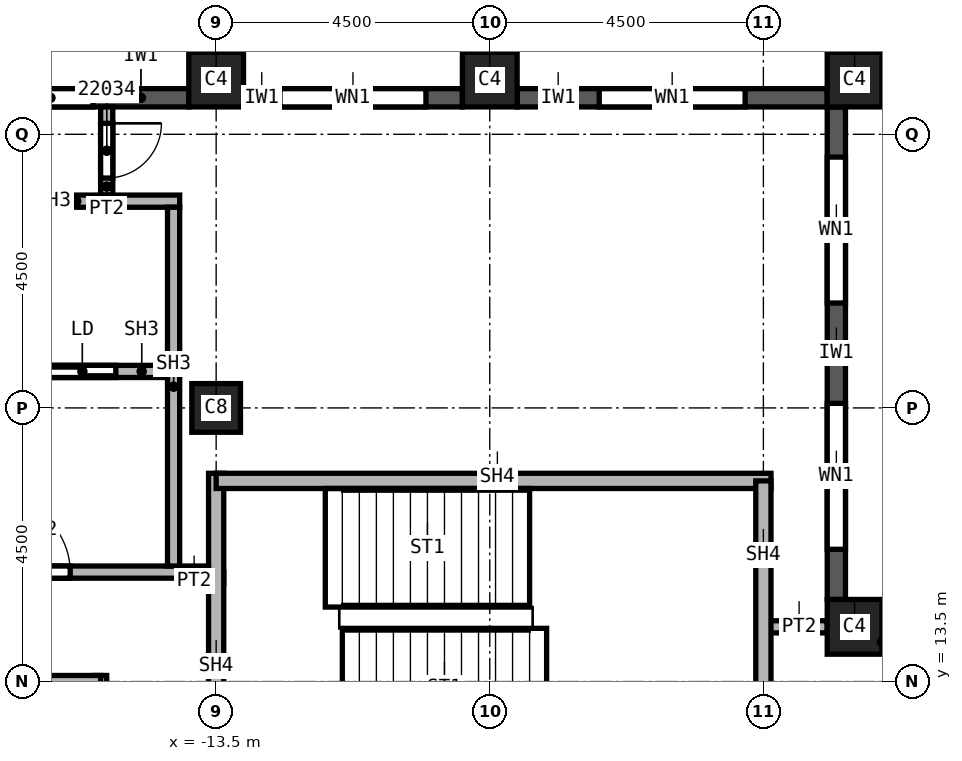
"""IFC4 building model, lengths in metres.
Left out: names, types, materials, properties, quantities, classifications, styles, units other than length and angle.
Written with IfcOpenShell. Run it as: python <this file> out.ifc"""

import sys

from ifc_helpers import new_model, si_unit, direction, frame, frame_2d, origin, origin_2d, place, context, subcontext, project, spatial, rectangle, extrude, element, fill, save


model = new_model("IFC4")
c1 = context("Model", 3, precision=1e-05, world=origin(), true_north=direction((0.0, 1.0)))
c2 = subcontext(c1, "Body", "Model", "MODEL_VIEW")
j1 = project(units=[si_unit("LENGTHUNIT", "METRE"), si_unit("PLANEANGLEUNIT", "RADIAN")], contexts=[c1])
p1 = place(None, origin())
s1 = spatial("IfcSite", under=j1, at=p1, CompositionType="ELEMENT")
p2 = place(p1, origin())
s2 = spatial("IfcBuilding", under=s1, at=p2, CompositionType="ELEMENT")
p3 = place(p2, frame((0.0, 0.0, 316.0)))
s3 = spatial("IfcBuildingStorey", under=s2, at=p3, CompositionType="ELEMENT", Elevation=316.0)
p4 = place(p3, frame((-13.5, 18.0, 0.0), z_axis=(0.0, 0.0, 1.0), x_axis=(1.0, 0.0, 0.0)))
e1 = element("IfcColumn", 1, at=p4, inside=s3, PredefinedType="COLUMN", context=c2, shape_type="SweptSolid", body=[
    extrude(rectangle(XDim=0.8, YDim=0.8, at=origin_2d()), origin(), (0.0, 0.0, 1.0), 3.59),
])
for number, where, z_axis, x_axis in (
    (2, (-3.0, 23.4, 0.0), (0.0, 0.0, 1.0), (1.0, 0.0, 0.0)),
    (3, (-9.0, 23.4, 0.0), (0.0, 0.0, 1.0), (1.0, 0.0, 0.0)),
    (4, (-13.5, 23.4, 0.0), (0.0, 0.0, 1.0), (1.0, 0.0, 0.0)),
    (5, (-3.0, 14.4, 0.0), (0.0, 0.0, 1.0), (1.0, 0.0, 0.0)),
):
    element("IfcColumn", number, at=place(p3, frame(where, z_axis=z_axis, x_axis=x_axis)), inside=s3, PredefinedType="COLUMN", context=c2, shape_type="SweptSolid", body=[
        extrude(rectangle(XDim=0.9, YDim=0.9, at=origin_2d()), origin(), (0.0, 0.0, 1.0), 3.59),
    ])
p5 = place(p3, frame((-3.3, 14.85, 0.0), z_axis=(0.0, 0.0, 1.0), x_axis=(0.0, 1.0, 0.0)))
e6 = element("IfcWall", 6, at=p5, inside=s3, PredefinedType="SOLIDWALL", context=c2, shape_type="SweptSolid", body=[
    extrude(rectangle(XDim=8.1, YDim=0.3, at=frame_2d((4.05, 0.0))), origin(), (0.0, 0.0, 1.0), 2.99),
])
p6 = place(p5, frame((0.825, 0.0, 0.8)))
e7 = element("IfcOpeningElement", 7, at=p6, cuts=e6, PredefinedType="OPENING", context=c2, shape_type="SweptSolid", body=[
    extrude(rectangle(XDim=2.4, YDim=1.95, at=frame_2d((1.2, 0.975))), frame((0.0, 0.15, 0.0), z_axis=(0.0, -1.0, 0.0), x_axis=(1.0, 0.0, 0.0)), (0.0, 0.0, 1.0), 0.3),
])
p7 = place(p5, frame((4.875, 0.0, 0.8)))
e8 = element("IfcOpeningElement", 8, at=p7, cuts=e6, PredefinedType="OPENING", context=c2, shape_type="SweptSolid", body=[
    extrude(rectangle(XDim=2.4, YDim=1.95, at=frame_2d((1.2, 0.975))), frame((0.0, 0.15, 0.0), z_axis=(0.0, -1.0, 0.0), x_axis=(1.0, 0.0, 0.0)), (0.0, 0.0, 1.0), 0.3),
])
p8 = place(p3, frame((-3.45, 23.1, 0.0), z_axis=(0.0, 0.0, 1.0), x_axis=(-1.0, 0.0, 0.0)))
e9 = element("IfcWall", 9, at=p8, inside=s3, PredefinedType="SOLIDWALL", context=c2, shape_type="SweptSolid", body=[
    extrude(rectangle(XDim=5.1, YDim=0.3, at=frame_2d((2.55, 0.0))), origin(), (0.0, 0.0, 1.0), 2.99),
])
p9 = place(p8, frame((1.35, 0.0, 0.8)))
e10 = element("IfcOpeningElement", 10, at=p9, cuts=e9, PredefinedType="OPENING", context=c2, shape_type="SweptSolid", body=[
    extrude(rectangle(XDim=2.4, YDim=1.95, at=frame_2d((1.2, 0.975))), frame((0.0, 0.15, 0.0), z_axis=(0.0, -1.0, 0.0), x_axis=(1.0, 0.0, 0.0)), (0.0, 0.0, 1.0), 0.3),
])
p10 = place(p3, frame((-9.45, 23.1, 0.0), z_axis=(0.0, 0.0, 1.0), x_axis=(-1.0, 0.0, 0.0)))
e11 = element("IfcWall", 11, at=p10, inside=s3, PredefinedType="SOLIDWALL", context=c2, shape_type="SweptSolid", body=[
    extrude(rectangle(XDim=3.6, YDim=0.3, at=frame_2d((1.8, 0.0))), origin(), (0.0, 0.0, 1.0), 2.99),
])
p11 = place(p10, frame((0.6, 0.0, 0.8)))
e12 = element("IfcOpeningElement", 12, at=p11, cuts=e11, PredefinedType="OPENING", context=c2, shape_type="SweptSolid", body=[
    extrude(rectangle(XDim=2.4, YDim=1.95, at=frame_2d((1.2, 0.975))), frame((0.0, 0.15, 0.0), z_axis=(0.0, -1.0, 0.0), x_axis=(1.0, 0.0, 0.0)), (0.0, 0.0, 1.0), 0.3),
])
p12 = place(p3, frame((-13.95, 23.1, 0.0), z_axis=(0.0, 0.0, 1.0), x_axis=(-1.0, 0.0, 0.0)))
e13 = element("IfcWall", 13, at=p12, inside=s3, PredefinedType="SOLIDWALL", context=c2, shape_type="SweptSolid", body=[
    extrude(rectangle(XDim=3.6, YDim=0.3, at=frame_2d((1.8, 0.0))), origin(), (0.0, 0.0, 1.0), 2.99),
])
p13 = place(p12, frame((1.575, 0.0, 0.8)))
e14 = element("IfcOpeningElement", 14, at=p13, cuts=e13, PredefinedType="OPENING", context=c2, shape_type="SweptSolid", body=[
    extrude(rectangle(XDim=1.4, YDim=1.95, at=frame_2d((0.7, 0.975))), frame((0.0, 0.15, 0.0), z_axis=(0.0, -1.0, 0.0), x_axis=(1.0, 0.0, 0.0)), (0.0, 0.0, 1.0), 0.3),
])
p14 = place(p3, frame((-15.4, -22.95, 0.0), z_axis=(0.0, 0.0, 1.0), x_axis=(0.0, 1.0, 0.0)))
e15 = element("IfcWall", 15, at=p14, inside=s3, PredefinedType="PARTITIONING", context=c2, shape_type="SweptSolid", body=[
    extrude(rectangle(XDim=36.55, YDim=0.2, at=frame_2d((18.275, 0.0))), origin(), (0.0, 0.0, 1.0), 3.59),
])
p15 = place(p14, frame((24.3, 0.0, 0.0)))
e16 = element("IfcOpeningElement", 16, at=p15, cuts=e15, PredefinedType="OPENING", context=c2, shape_type="SweptSolid", body=[
    extrude(rectangle(XDim=1.0, YDim=2.1, at=frame_2d((0.5, 1.05))), frame((0.0, 0.1, 0.0), z_axis=(0.0, -1.0, 0.0), x_axis=(1.0, 0.0, 0.0)), (0.0, 0.0, 1.0), 0.2),
])
p16 = place(p14, frame((9.4, 0.0, 0.0)))
e17 = element("IfcOpeningElement", 17, at=p16, cuts=e15, PredefinedType="OPENING", context=c2, shape_type="SweptSolid", body=[
    extrude(rectangle(XDim=1.0, YDim=2.1, at=frame_2d((0.5, 1.05))), frame((0.0, 0.1, 0.0), z_axis=(0.0, -1.0, 0.0), x_axis=(1.0, 0.0, 0.0)), (0.0, 0.0, 1.0), 0.2),
])
p17 = place(p14, frame((19.05, 0.0, 0.0)))
e18 = element("IfcOpeningElement", 18, at=p17, cuts=e15, PredefinedType="OPENING", context=c2, shape_type="SweptSolid", body=[
    extrude(rectangle(XDim=1.0, YDim=2.1, at=frame_2d((0.5, 1.05))), frame((0.0, 0.1, 0.0), z_axis=(0.0, -1.0, 0.0), x_axis=(1.0, 0.0, 0.0)), (0.0, 0.0, 1.0), 0.2),
])
p18 = place(p3, frame((-15.4, 13.5, 0.0), z_axis=(0.0, 0.0, 1.0), x_axis=(-1.0, 0.0, 0.0)))
e19 = element("IfcWall", 19, at=p18, inside=s3, PredefinedType="PARTITIONING", context=c2, shape_type="SweptSolid", body=[
    extrude(rectangle(XDim=6.6, YDim=0.2, at=frame_2d((3.3, 0.0))), origin(), (0.0, 0.0, 1.0), 3.59),
])
p19 = place(p18, frame((5.35, 0.0, 0.0)))
e20 = element("IfcOpeningElement", 20, at=p19, cuts=e19, PredefinedType="OPENING", context=c2, shape_type="SweptSolid", body=[
    extrude(rectangle(XDim=1.0, YDim=2.1, at=frame_2d((0.5, 1.05))), frame((0.0, 0.1, 0.0), z_axis=(0.0, -1.0, 0.0), x_axis=(1.0, 0.0, 0.0)), (0.0, 0.0, 1.0), 0.2),
])
p20 = place(p3, frame((-15.3, 22.95, 0.0), z_axis=(0.0, 0.0, 1.0), x_axis=(0.0, -1.0, 0.0)))
e21 = element("IfcWall", 21, at=p20, inside=s3, PredefinedType="PARTITIONING", context=c2, shape_type="SweptSolid", body=[
    extrude(rectangle(XDim=1.45, YDim=0.2, at=frame_2d((0.725, 0.0))), origin(), (0.0, 0.0, 1.0), 3.59),
])
p21 = place(p20, frame((0.27, 0.0, 0.0)))
e22 = element("IfcOpeningElement", 22, at=p21, cuts=e21, PredefinedType="OPENING", context=c2, shape_type="SweptSolid", body=[
    extrude(rectangle(XDim=0.9, YDim=2.1, at=frame_2d((0.45, 1.05))), frame((0.0, 0.1, 0.0), z_axis=(0.0, -1.0, 0.0), x_axis=(1.0, 0.0, 0.0)), (0.0, 0.0, 1.0), 0.2),
])
p22 = place(p3, frame((-14.1, 15.2, 0.0), z_axis=(0.0, 0.0, 1.0), x_axis=(1.0, 0.0, 0.0)))
e23 = element("IfcWall", 23, at=p22, inside=s3, PredefinedType="PARTITIONING", context=c2, shape_type="SweptSolid", body=[
    extrude(rectangle(XDim=0.725, YDim=0.2, at=frame_2d((0.363, 0.0))), origin(), (0.0, 0.0, 1.0), 3.59),
])
p23 = place(p3, frame((-4.5, 14.4, 0.0), z_axis=(0.0, 0.0, 1.0), x_axis=(1.0, 0.0, 0.0)))
e24 = element("IfcWall", 24, at=p23, inside=s3, PredefinedType="PARTITIONING", context=c2, shape_type="SweptSolid", body=[
    extrude(rectangle(XDim=1.05, YDim=0.2, at=frame_2d((0.525, 0.0))), origin(), (0.0, 0.0, 1.0), 3.59),
])
p24 = place(p3, frame((-13.5, 12.175, 0.0), z_axis=(0.0, 0.0, 1.0), x_axis=(0.0, 1.0, 0.0)))
e25 = element("IfcWall", 25, at=p24, inside=s3, PredefinedType="SOLIDWALL", context=c2, shape_type="SweptSolid", body=[
    extrude(rectangle(XDim=4.75, YDim=0.25, at=frame_2d((2.375, 0.0))), origin(), (0.0, 0.0, 1.0), 3.59),
])
p25 = place(p3, frame((-13.5, 16.8, 0.0), z_axis=(0.0, 0.0, 1.0), x_axis=(1.0, 0.0, 0.0)))
e26 = element("IfcWall", 26, at=p25, inside=s3, PredefinedType="SOLIDWALL", context=c2, shape_type="SweptSolid", body=[
    extrude(rectangle(XDim=9.125, YDim=0.25, at=frame_2d((4.562, 0.0))), origin(), (0.0, 0.0, 1.0), 3.59),
])
p26 = place(p3, frame((-4.5, 16.8, 0.0), z_axis=(0.0, 0.0, 1.0), x_axis=(0.0, -1.0, 0.0)))
e27 = element("IfcWall", 27, at=p26, inside=s3, PredefinedType="SOLIDWALL", context=c2, shape_type="SweptSolid", body=[
    extrude(rectangle(XDim=4.5, YDim=0.25, at=frame_2d((2.25, 0.0))), origin(), (0.0, 0.0, 1.0), 3.59),
])
p27 = place(p3, frame((-21.9, 15.3, 0.0), z_axis=(0.0, 0.0, 1.0), x_axis=(1.0, 0.0, 0.0)))
e28 = element("IfcWall", 28, at=p27, inside=s3, PredefinedType="SOLIDWALL", context=c2, shape_type="SweptSolid", body=[
    extrude(rectangle(XDim=8.275, YDim=0.2, at=frame_2d((4.137, 0.0))), origin(), (0.0, 0.0, 1.0), 3.59),
])
p28 = place(p27, frame((4.8, 0.0, 0.0)))
e29 = element("IfcOpeningElement", 29, at=p28, cuts=e28, PredefinedType="OPENING", context=c2, shape_type="SweptSolid", body=[
    extrude(rectangle(XDim=1.2, YDim=2.1, at=frame_2d((0.6, 1.05))), frame((0.0, 0.1, 0.0), z_axis=(0.0, -1.0, 0.0), x_axis=(1.0, 0.0, 0.0)), (0.0, 0.0, 1.0), 0.2),
])
p29 = place(p3, frame((-21.9, 21.4, 0.0), z_axis=(0.0, 0.0, 1.0), x_axis=(1.0, 0.0, 0.0)))
e30 = element("IfcWall", 30, at=p29, inside=s3, PredefinedType="SOLIDWALL", context=c2, shape_type="SweptSolid", body=[
    extrude(rectangle(XDim=7.8, YDim=0.2, at=frame_2d((3.9, 0.0))), origin(), (0.0, 0.0, 1.0), 3.59),
])
p30 = place(p29, frame((3.2, 0.0, 0.0)))
e31 = element("IfcOpeningElement", 31, at=p30, cuts=e30, PredefinedType="OPENING", context=c2, shape_type="SweptSolid", body=[
    extrude(rectangle(XDim=1.2, YDim=2.1, at=frame_2d((0.6, 1.05))), frame((0.0, 0.1, 0.0), z_axis=(0.0, -1.0, 0.0), x_axis=(1.0, 0.0, 0.0)), (0.0, 0.0, 1.0), 0.2),
])
p31 = place(p3, frame((-14.2, 15.4, 0.0), z_axis=(0.0, 0.0, 1.0), x_axis=(0.0, 1.0, 0.0)))
e32 = element("IfcWall", 32, at=p31, inside=s3, PredefinedType="SOLIDWALL", context=c2, shape_type="SweptSolid", body=[
    extrude(rectangle(XDim=5.9, YDim=0.2, at=frame_2d((2.95, 0.0))), origin(), (0.0, 0.0, 1.0), 3.59),
])
p32 = place(p3, frame((-17.1, 18.6, 0.0), z_axis=(0.0, 0.0, 1.0), x_axis=(1.0, 0.0, 0.0)))
e33 = element("IfcWall", 33, at=p32, inside=s3, PredefinedType="SOLIDWALL", context=c2, shape_type="SweptSolid", body=[
    extrude(rectangle(XDim=2.8, YDim=0.2, at=frame_2d((1.4, 0.0))), origin(), (0.0, 0.0, 1.0), 3.59),
])
p33 = place(p32, frame((0.85, 0.0, 0.0)))
e34 = element("IfcOpeningElement", 34, at=p33, cuts=e33, PredefinedType="OPENING", context=c2, shape_type="SweptSolid", body=[
    extrude(rectangle(XDim=1.1, YDim=2.1, at=frame_2d((0.55, 1.05))), frame((0.0, 0.1, 0.0), z_axis=(0.0, -1.0, 0.0), x_axis=(1.0, 0.0, 0.0)), (0.0, 0.0, 1.0), 0.2),
])
p34 = place(p6, origin())
e35 = element("IfcWindow", 35, at=p34, inside=s3, PartitioningType="SINGLE_PANEL", PredefinedType="WINDOW", context=c2, shape_type="SweptSolid", body=[
    extrude(rectangle(XDim=2.4, YDim=1.95, at=frame_2d((1.2, 0.975))), frame((0.0, 0.03, 0.0), z_axis=(0.0, -1.0, 0.0), x_axis=(1.0, 0.0, 0.0)), (0.0, 0.0, 1.0), 0.06),
])
fill(e7, e35)
p35 = place(p7, origin())
e36 = element("IfcWindow", 36, at=p35, inside=s3, PartitioningType="SINGLE_PANEL", PredefinedType="WINDOW", context=c2, shape_type="SweptSolid", body=[
    extrude(rectangle(XDim=2.4, YDim=1.95, at=frame_2d((1.2, 0.975))), frame((0.0, 0.03, 0.0), z_axis=(0.0, -1.0, 0.0), x_axis=(1.0, 0.0, 0.0)), (0.0, 0.0, 1.0), 0.06),
])
fill(e8, e36)
p36 = place(p9, origin())
e37 = element("IfcWindow", 37, at=p36, inside=s3, PartitioningType="SINGLE_PANEL", PredefinedType="WINDOW", context=c2, shape_type="SweptSolid", body=[
    extrude(rectangle(XDim=2.4, YDim=1.95, at=frame_2d((1.2, 0.975))), frame((0.0, 0.03, 0.0), z_axis=(0.0, -1.0, 0.0), x_axis=(1.0, 0.0, 0.0)), (0.0, 0.0, 1.0), 0.06),
])
fill(e10, e37)
p37 = place(p11, origin())
e38 = element("IfcWindow", 38, at=p37, inside=s3, PartitioningType="SINGLE_PANEL", PredefinedType="WINDOW", context=c2, shape_type="SweptSolid", body=[
    extrude(rectangle(XDim=2.4, YDim=1.95, at=frame_2d((1.2, 0.975))), frame((0.0, 0.03, 0.0), z_axis=(0.0, -1.0, 0.0), x_axis=(1.0, 0.0, 0.0)), (0.0, 0.0, 1.0), 0.06),
])
fill(e12, e38)
p38 = place(p21, origin())
e39 = element("IfcDoor", 39, at=p38, inside=s3, OperationType="SINGLE_SWING_LEFT", PredefinedType="DOOR", context=c2, shape_type="SweptSolid", body=[
    extrude(rectangle(XDim=0.9, YDim=2.1, at=frame_2d((0.45, 1.05))), frame((0.0, 0.025, 0.0), z_axis=(0.0, -1.0, 0.0), x_axis=(1.0, 0.0, 0.0)), (0.0, 0.0, 1.0), 0.05),
])
fill(e22, e39)
p39 = place(p33, origin())
e40 = element("IfcDoor", 40, at=p39, inside=s3, OperationType="SLIDING_TO_LEFT", PredefinedType="DOOR", context=c2, shape_type="SweptSolid", body=[
    extrude(rectangle(XDim=1.1, YDim=2.1, at=frame_2d((0.55, 1.05))), frame((0.0, 0.025, 0.0), z_axis=(0.0, -1.0, 0.0), x_axis=(1.0, 0.0, 0.0)), (0.0, 0.0, 1.0), 0.05),
])
fill(e34, e40)
p40 = place(p28, origin())
e41 = element("IfcDoor", 41, at=p40, inside=s3, OperationType="SINGLE_SWING_RIGHT", PredefinedType="DOOR", context=c2, shape_type="SweptSolid", body=[
    extrude(rectangle(XDim=1.2, YDim=2.1, at=frame_2d((0.6, 1.05))), frame((0.0, 0.025, 0.0), z_axis=(0.0, -1.0, 0.0), x_axis=(1.0, 0.0, 0.0)), (0.0, 0.0, 1.0), 0.05),
])
fill(e29, e41)
p41 = place(p13, origin())
e42 = element("IfcWindow", 42, at=p41, inside=s3, PartitioningType="SINGLE_PANEL", PredefinedType="WINDOW", context=c2, shape_type="SweptSolid", body=[
    extrude(rectangle(XDim=1.4, YDim=1.95, at=frame_2d((0.7, 0.975))), frame((0.0, 0.03, 0.0), z_axis=(0.0, -1.0, 0.0), x_axis=(1.0, 0.0, 0.0)), (0.0, 0.0, 1.0), 0.06),
])
fill(e14, e42)
save(model, sys.argv[1])
